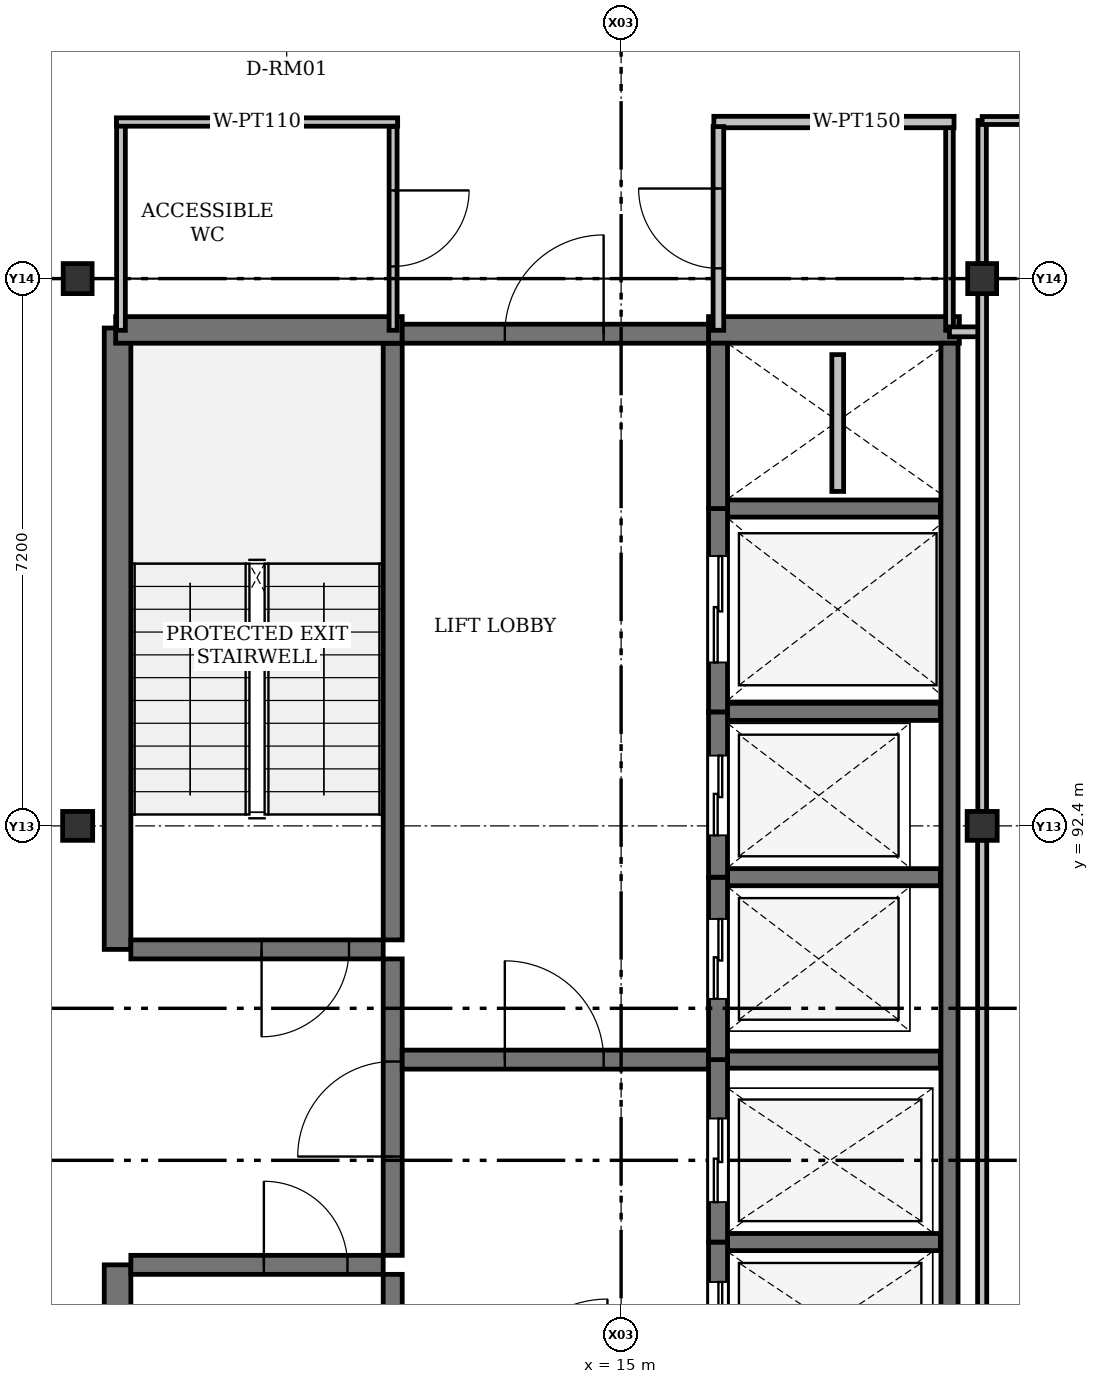
"""IFC4 building model, lengths in metres.
Left out: names, types, materials, properties, quantities, classifications, styles, units other than length and angle.
Written with IfcOpenShell. Run it as: python <this file> out.ifc"""

import sys

from ifc_helpers import new_model, si_unit, direction, frame, frame_2d, origin, origin_2d, place, context, subcontext, project, spatial, rectangle, i_section, extrude, element, fill, save


model = new_model("IFC4")
c1 = context("Model", 3, precision=1e-05, world=origin(), true_north=direction((0.0, 1.0)))
c2 = subcontext(c1, "Body", "Model", "MODEL_VIEW")
j1 = project(units=[si_unit("LENGTHUNIT", "METRE"), si_unit("PLANEANGLEUNIT", "RADIAN")], contexts=[c1])
p1 = place(None, origin())
s1 = spatial("IfcSite", under=j1, at=p1, CompositionType="ELEMENT")
p2 = place(p1, origin())
s2 = spatial("IfcBuilding", under=s1, at=p2, CompositionType="ELEMENT")
p3 = place(p2, frame((0.0, 0.0, 14.1)))
s3 = spatial("IfcBuildingStorey", under=s2, at=p3, CompositionType="ELEMENT", Elevation=14.1)
for number, where, z_axis, x_axis in (
    (1, (7.85, 92.4, 0.0), (0.0, 0.0, 1.0), (1.0, 0.0, 0.0)),
    (2, (19.75, 92.4, 0.0), (0.0, 0.0, 1.0), (1.0, 0.0, 0.0)),
    (3, (7.85, 99.6, 0.0), (0.0, 0.0, 1.0), (0.0, 1.0, 0.0)),
    (4, (19.75, 99.6, 0.0), (0.0, 0.0, 1.0), (0.0, 1.0, 0.0)),
):
    element("IfcColumn", number, at=place(p3, frame(where, z_axis=z_axis, x_axis=x_axis)), inside=s3, PredefinedType="COLUMN", context=c2, shape_type="SweptSolid", body=[
        extrude(i_section(OverallWidth=0.395, OverallDepth=0.38, WebThickness=0.019, FlangeThickness=0.03, FilletRadius=0.015, at=origin_2d()), origin(), (0.0, 0.0, 1.0), 4.2),
    ])
for number, where, z_axis, x_axis in (
    (5, (8.375, 78.45, 0.0), (0.0, 0.0, 1.0), (0.0, 1.0, 0.0)),
    (6, (8.375, 90.775, 0.0), (0.0, 0.0, 1.0), (0.0, 1.0, 0.0)),
):
    element("IfcWall", number, at=place(p3, frame(where, z_axis=z_axis, x_axis=x_axis)), inside=s3, PredefinedType="SHEAR", context=c2, shape_type="SweptSolid", body=[
        extrude(rectangle(XDim=8.175, YDim=0.35, at=frame_2d((4.087, 0.0))), origin(), (0.0, 0.0, 1.0), 4.2),
    ])
for number, where, z_axis, x_axis in (
    (7, (11.995, 78.65, 0.0), (0.0, 0.0, 1.0), (0.0, 1.0, 0.0)),
    (8, (11.995, 90.9, 0.0), (0.0, 0.0, 1.0), (0.0, 1.0, 0.0)),
):
    element("IfcWall", number, at=place(p3, frame(where, z_axis=z_axis, x_axis=x_axis)), inside=s3, PredefinedType="SHEAR", context=c2, shape_type="SweptSolid", body=[
        extrude(rectangle(XDim=7.85, YDim=0.25, at=frame_2d((3.925, 0.0))), origin(), (0.0, 0.0, 1.0), 4.2),
    ])
p4 = place(p3, frame((11.995, 86.75, 0.0), z_axis=(0.0, 0.0, 1.0), x_axis=(0.0, 1.0, 0.0)))
e9 = element("IfcWall", 9, at=p4, inside=s3, PredefinedType="SHEAR", context=c2, shape_type="SweptSolid", body=[
    extrude(rectangle(XDim=3.9, YDim=0.25, at=frame_2d((1.95, 0.0))), origin(), (0.0, 0.0, 1.0), 4.2),
])
p5 = place(p4, frame((1.3, 0.0, 0.0)))
e10 = element("IfcOpeningElement", 10, at=p5, cuts=e9, PredefinedType="OPENING", context=c2, shape_type="SweptSolid", body=[
    extrude(rectangle(XDim=1.25, YDim=2.2, at=frame_2d((0.625, 1.1))), frame((0.0, 0.125, 0.0), z_axis=(0.0, -1.0, 0.0), x_axis=(1.0, 0.0, 0.0)), (0.0, 0.0, 1.0), 0.25),
])
p6 = place(p3, frame((8.35, 98.925, 0.0), z_axis=(0.0, 0.0, 1.0), x_axis=(1.0, 0.0, 0.0)))
e11 = element("IfcWall", 11, at=p6, inside=s3, PredefinedType="SHEAR", context=c2, shape_type="SweptSolid", body=[
    extrude(rectangle(XDim=3.77, YDim=0.35, at=frame_2d((1.885, 0.0))), origin(), (0.0, 0.0, 1.0), 4.2),
])
p7 = place(p3, frame((16.15, 98.925, 0.0), z_axis=(0.0, 0.0, 1.0), x_axis=(1.0, 0.0, 0.0)))
e12 = element("IfcWall", 12, at=p7, inside=s3, PredefinedType="SHEAR", context=c2, shape_type="SweptSolid", body=[
    extrude(rectangle(XDim=3.3, YDim=0.35, at=frame_2d((1.65, 0.0))), origin(), (0.0, 0.0, 1.0), 4.2),
])
p8 = place(p3, frame((12.12, 98.875, 0.0), z_axis=(0.0, 0.0, 1.0), x_axis=(1.0, 0.0, 0.0)))
e13 = element("IfcWall", 13, at=p8, inside=s3, PredefinedType="SHEAR", context=c2, shape_type="SweptSolid", body=[
    extrude(rectangle(XDim=4.03, YDim=0.25, at=frame_2d((2.015, 0.0))), origin(), (0.0, 0.0, 1.0), 4.2),
])
p9 = place(p8, frame((1.35, 0.0, 0.0)))
e14 = element("IfcOpeningElement", 14, at=p9, cuts=e13, PredefinedType="OPENING", context=c2, shape_type="SweptSolid", body=[
    extrude(rectangle(XDim=1.3, YDim=2.2, at=frame_2d((0.65, 1.1))), frame((0.0, 0.125, 0.0), z_axis=(0.0, -1.0, 0.0), x_axis=(1.0, 0.0, 0.0)), (0.0, 0.0, 1.0), 0.25),
])
p10 = place(p3, frame((8.55, 86.625, 0.0), z_axis=(0.0, 0.0, 1.0), x_axis=(1.0, 0.0, 0.0)))
e15 = element("IfcWall", 15, at=p10, inside=s3, PredefinedType="SHEAR", context=c2, shape_type="SweptSolid", body=[
    extrude(rectangle(XDim=3.32, YDim=0.25, at=frame_2d((1.66, 0.0))), origin(), (0.0, 0.0, 1.0), 4.2),
])
p11 = place(p10, frame((1.75, 0.0, 0.0)))
e16 = element("IfcOpeningElement", 16, at=p11, cuts=e15, PredefinedType="OPENING", context=c2, shape_type="SweptSolid", body=[
    extrude(rectangle(XDim=1.1, YDim=2.15, at=frame_2d((0.55, 1.075))), frame((0.0, 0.125, 0.0), z_axis=(0.0, -1.0, 0.0), x_axis=(1.0, 0.0, 0.0)), (0.0, 0.0, 1.0), 0.25),
])
p12 = place(p3, frame((11.87, 90.775, 0.0), z_axis=(0.0, 0.0, 1.0), x_axis=(-1.0, 0.0, 0.0)))
e17 = element("IfcWall", 17, at=p12, inside=s3, PredefinedType="SHEAR", context=c2, shape_type="SweptSolid", body=[
    extrude(rectangle(XDim=3.32, YDim=0.25, at=frame_2d((1.66, 0.0))), origin(), (0.0, 0.0, 1.0), 4.2),
])
p13 = place(p12, frame((0.45, 0.0, 0.0)))
e18 = element("IfcOpeningElement", 18, at=p13, cuts=e17, PredefinedType="OPENING", context=c2, shape_type="SweptSolid", body=[
    extrude(rectangle(XDim=1.15, YDim=2.15, at=frame_2d((0.575, 1.075))), frame((0.0, 0.125, 0.0), z_axis=(0.0, -1.0, 0.0), x_axis=(1.0, 0.0, 0.0)), (0.0, 0.0, 1.0), 0.25),
])
p14 = place(p3, frame((12.12, 89.325, 0.0), z_axis=(0.0, 0.0, 1.0), x_axis=(1.0, 0.0, 0.0)))
e19 = element("IfcWall", 19, at=p14, inside=s3, PredefinedType="SHEAR", context=c2, shape_type="SweptSolid", body=[
    extrude(rectangle(XDim=4.03, YDim=0.25, at=frame_2d((2.015, 0.0))), origin(), (0.0, 0.0, 1.0), 4.2),
])
p15 = place(p14, frame((1.35, 0.0, 0.0)))
e20 = element("IfcOpeningElement", 20, at=p15, cuts=e19, PredefinedType="OPENING", context=c2, shape_type="SweptSolid", body=[
    extrude(rectangle(XDim=1.3, YDim=2.2, at=frame_2d((0.65, 1.1))), frame((0.0, 0.125, 0.0), z_axis=(0.0, -1.0, 0.0), x_axis=(1.0, 0.0, 0.0)), (0.0, 0.0, 1.0), 0.25),
])
p16 = place(p3, frame((19.32, 84.8, 0.0), z_axis=(0.0, 0.0, 1.0), x_axis=(0.0, 1.0, 0.0)))
e21 = element("IfcWall", 21, at=p16, inside=s3, PredefinedType="SHEAR", context=c2, shape_type="SweptSolid", body=[
    extrude(rectangle(XDim=13.95, YDim=0.225, at=frame_2d((6.975, 0.0))), origin(), (0.0, 0.0, 1.0), 4.2),
])
for number, where, z_axis, x_axis in (
    (22, (16.4, 86.925, 0.0), (0.0, 0.0, 1.0), (1.0, 0.0, 0.0)),
    (23, (16.4, 89.325, 0.0), (0.0, 0.0, 1.0), (1.0, 0.0, 0.0)),
    (24, (16.4, 91.725, 0.0), (0.0, 0.0, 1.0), (1.0, 0.0, 0.0)),
    (25, (16.4, 93.9, 0.0), (0.0, 0.0, 1.0), (1.0, 0.0, 0.0)),
    (26, (16.4, 96.575, 0.0), (0.0, 0.0, 1.0), (1.0, 0.0, 0.0)),
):
    element("IfcWall", number, at=place(p3, frame(where, z_axis=z_axis, x_axis=x_axis)), inside=s3, PredefinedType="SHEAR", context=c2, shape_type="SweptSolid", body=[
        extrude(rectangle(XDim=2.8, YDim=0.225, at=frame_2d((1.4, 0.0))), origin(), (0.0, 0.0, 1.0), 4.2),
    ])
p17 = place(p3, frame((16.275, 84.8, 0.0), z_axis=(0.0, 0.0, 1.0), x_axis=(0.0, 1.0, 0.0)))
e27 = element("IfcWall", 27, at=p17, inside=s3, PredefinedType="SHEAR", context=c2, shape_type="SweptSolid", body=[
    extrude(rectangle(XDim=2.125, YDim=0.25, at=frame_2d((1.062, 0.0))), origin(), (0.0, 0.0, 1.0), 4.2),
])
p18 = place(p17, frame((0.5, 0.0, 0.0)))
e28 = element("IfcOpeningElement", 28, at=p18, cuts=e27, PredefinedType="OPENING", context=c2, shape_type="SweptSolid", body=[
    extrude(rectangle(XDim=1.1, YDim=2.15, at=frame_2d((0.55, 1.075))), frame((0.0, 0.125, 0.0), z_axis=(0.0, -1.0, 0.0), x_axis=(1.0, 0.0, 0.0)), (0.0, 0.0, 1.0), 0.25),
])
p19 = place(p3, frame((16.275, 86.925, 0.0), z_axis=(0.0, 0.0, 1.0), x_axis=(0.0, 1.0, 0.0)))
e29 = element("IfcWall", 29, at=p19, inside=s3, PredefinedType="SHEAR", context=c2, shape_type="SweptSolid", body=[
    extrude(rectangle(XDim=2.4, YDim=0.25, at=frame_2d((1.2, 0.0))), origin(), (0.0, 0.0, 1.0), 4.2),
])
p20 = place(p19, frame((0.525, 0.0, 0.0)))
e30 = element("IfcOpeningElement", 30, at=p20, cuts=e29, PredefinedType="OPENING", context=c2, shape_type="SweptSolid", body=[
    extrude(rectangle(XDim=1.1, YDim=2.15, at=frame_2d((0.55, 1.075))), frame((0.0, 0.125, 0.0), z_axis=(0.0, -1.0, 0.0), x_axis=(1.0, 0.0, 0.0)), (0.0, 0.0, 1.0), 0.25),
])
p21 = place(p3, frame((16.275, 89.325, 0.0), z_axis=(0.0, 0.0, 1.0), x_axis=(0.0, 1.0, 0.0)))
e31 = element("IfcWall", 31, at=p21, inside=s3, PredefinedType="SHEAR", context=c2, shape_type="SweptSolid", body=[
    extrude(rectangle(XDim=2.4, YDim=0.25, at=frame_2d((1.2, 0.0))), origin(), (0.0, 0.0, 1.0), 4.2),
])
p22 = place(p21, frame((0.8, 0.0, 0.0)))
e32 = element("IfcOpeningElement", 32, at=p22, cuts=e31, PredefinedType="OPENING", context=c2, shape_type="SweptSolid", body=[
    extrude(rectangle(XDim=1.05, YDim=2.15, at=frame_2d((0.525, 1.075))), frame((0.0, 0.125, 0.0), z_axis=(0.0, -1.0, 0.0), x_axis=(1.0, 0.0, 0.0)), (0.0, 0.0, 1.0), 0.25),
])
p23 = place(p3, frame((16.275, 91.725, 0.0), z_axis=(0.0, 0.0, 1.0), x_axis=(0.0, 1.0, 0.0)))
e33 = element("IfcWall", 33, at=p23, inside=s3, PredefinedType="SHEAR", context=c2, shape_type="SweptSolid", body=[
    extrude(rectangle(XDim=2.175, YDim=0.25, at=frame_2d((1.087, 0.0))), origin(), (0.0, 0.0, 1.0), 4.2),
])
p24 = place(p23, frame((0.55, 0.0, 0.0)))
e34 = element("IfcOpeningElement", 34, at=p24, cuts=e33, PredefinedType="OPENING", context=c2, shape_type="SweptSolid", body=[
    extrude(rectangle(XDim=1.05, YDim=2.15, at=frame_2d((0.525, 1.075))), frame((0.0, 0.125, 0.0), z_axis=(0.0, -1.0, 0.0), x_axis=(1.0, 0.0, 0.0)), (0.0, 0.0, 1.0), 0.25),
])
p25 = place(p3, frame((16.275, 93.9, 0.0), z_axis=(0.0, 0.0, 1.0), x_axis=(0.0, 1.0, 0.0)))
e35 = element("IfcWall", 35, at=p25, inside=s3, PredefinedType="SHEAR", context=c2, shape_type="SweptSolid", body=[
    extrude(rectangle(XDim=2.675, YDim=0.25, at=frame_2d((1.337, 0.0))), origin(), (0.0, 0.0, 1.0), 4.2),
])
p26 = place(p25, frame((0.65, 0.0, 0.0)))
e36 = element("IfcOpeningElement", 36, at=p26, cuts=e35, PredefinedType="OPENING", context=c2, shape_type="SweptSolid", body=[
    extrude(rectangle(XDim=1.4, YDim=2.25, at=frame_2d((0.7, 1.125))), frame((0.0, 0.125, 0.0), z_axis=(0.0, -1.0, 0.0), x_axis=(1.0, 0.0, 0.0)), (0.0, 0.0, 1.0), 0.25),
])
p27 = place(p3, frame((16.275, 96.575, 0.0), z_axis=(0.0, 0.0, 1.0), x_axis=(0.0, 1.0, 0.0)))
e37 = element("IfcWall", 37, at=p27, inside=s3, PredefinedType="SHEAR", context=c2, shape_type="SweptSolid", body=[
    extrude(rectangle(XDim=2.175, YDim=0.25, at=frame_2d((1.087, 0.0))), origin(), (0.0, 0.0, 1.0), 4.2),
])
p28 = place(p3, frame((17.85, 96.8, 0.0), z_axis=(0.0, 0.0, 1.0), x_axis=(0.0, 1.0, 0.0)))
e38 = element("IfcWall", 38, at=p28, inside=s3, PredefinedType="PLUMBINGWALL", context=c2, shape_type="SweptSolid", body=[
    extrude(rectangle(XDim=1.8, YDim=0.155, at=frame_2d((0.9, 0.0))), origin(), (0.0, 0.0, 1.0), 4.2),
])
p29 = place(p3, frame((8.42, 98.92, 0.0), z_axis=(0.0, 0.0, 1.0), x_axis=(0.0, 1.0, 0.0)))
e39 = element("IfcWall", 39, at=p29, inside=s3, PredefinedType="PARTITIONING", context=c2, shape_type="SweptSolid", body=[
    extrude(rectangle(XDim=2.74, YDim=0.115, at=frame_2d((1.37, 0.0))), origin(), (0.0, 0.0, 1.0), 3.451),
])
p30 = place(p3, frame((8.36, 101.66, 0.0), z_axis=(0.0, 0.0, 1.0), x_axis=(1.0, 0.0, 0.0)))
e40 = element("IfcWall", 40, at=p30, inside=s3, PredefinedType="PARTITIONING", context=c2, shape_type="SweptSolid", body=[
    extrude(rectangle(XDim=3.7, YDim=0.11, at=frame_2d((1.85, 0.0))), origin(), (0.0, 0.0, 1.0), 3.95),
])
p31 = place(p3, frame((12.0, 101.6, 0.0), z_axis=(0.0, 0.0, 1.0), x_axis=(0.0, -1.0, 0.0)))
e41 = element("IfcWall", 41, at=p31, inside=s3, PredefinedType="PARTITIONING", context=c2, shape_type="SweptSolid", body=[
    extrude(rectangle(XDim=2.68, YDim=0.105, at=frame_2d((1.34, 0.0))), origin(), (0.0, 0.0, 1.0), 3.451),
])
p32 = place(p31, frame((0.84, 0.0, 0.0)))
e42 = element("IfcOpeningElement", 42, at=p32, cuts=e41, PredefinedType="OPENING", context=c2, shape_type="SweptSolid", body=[
    extrude(rectangle(XDim=1.0, YDim=2.2, at=frame_2d((0.5, 1.1))), frame((0.0, 0.052, 0.0), z_axis=(0.0, -1.0, 0.0), x_axis=(1.0, 0.0, 0.0)), (0.0, 0.0, 1.0), 0.105),
])
p33 = place(p3, frame((19.32, 98.92, 0.0), z_axis=(0.0, 0.0, 1.0), x_axis=(0.0, 1.0, 0.0)))
e43 = element("IfcWall", 43, at=p33, inside=s3, PredefinedType="PARTITIONING", context=c2, shape_type="SweptSolid", body=[
    extrude(rectangle(XDim=2.74, YDim=0.1, at=frame_2d((1.37, 0.0))), origin(), (0.0, 0.0, 1.0), 3.451),
])
p34 = place(p3, frame((19.38, 101.66, 0.0), z_axis=(0.0, 0.0, 1.0), x_axis=(-1.0, 0.0, 0.0)))
e44 = element("IfcWall", 44, at=p34, inside=s3, PredefinedType="PARTITIONING", context=c2, shape_type="SweptSolid", body=[
    extrude(rectangle(XDim=3.16, YDim=0.15, at=frame_2d((1.58, 0.0))), origin(), (0.0, 0.0, 1.0), 3.95),
])
p35 = place(p3, frame((16.28, 98.92, 0.0), z_axis=(0.0, 0.0, 1.0), x_axis=(0.0, 1.0, 0.0)))
e45 = element("IfcWall", 45, at=p35, inside=s3, PredefinedType="PARTITIONING", context=c2, shape_type="SweptSolid", body=[
    extrude(rectangle(XDim=2.68, YDim=0.14, at=frame_2d((1.34, 0.0))), origin(), (0.0, 0.0, 1.0), 3.451),
])
p36 = place(p35, frame((0.815, 0.0, 0.0)))
e46 = element("IfcOpeningElement", 46, at=p36, cuts=e45, PredefinedType="OPENING", context=c2, shape_type="SweptSolid", body=[
    extrude(rectangle(XDim=1.05, YDim=2.2, at=frame_2d((0.525, 1.1))), frame((0.0, 0.07, 0.0), z_axis=(0.0, -1.0, 0.0), x_axis=(1.0, 0.0, 0.0)), (0.0, 0.0, 1.0), 0.14),
])
p37 = place(p3, frame((19.75, 98.9, 0.0), z_axis=(0.0, 0.0, 1.0), x_axis=(-1.0, 0.0, 0.0)))
e47 = element("IfcWall", 47, at=p37, inside=s3, PredefinedType="PARTITIONING", context=c2, shape_type="SweptSolid", body=[
    extrude(rectangle(XDim=0.43, YDim=0.13, at=frame_2d((0.215, 0.0))), origin(), (0.0, 0.0, 1.0), 3.527),
])
p38 = place(p3, frame((19.75, 85.393, 0.0), z_axis=(0.0, 0.0, 1.0), x_axis=(0.0, 1.0, 0.0)))
e48 = element("IfcWall", 48, at=p38, inside=s3, PredefinedType="PARTITIONING", context=c2, shape_type="SweptSolid", body=[
    extrude(rectangle(XDim=6.823, YDim=0.12, at=frame_2d((3.411, 0.0))), origin(), (0.0, 0.0, 1.0), 3.527),
])
p39 = place(p3, frame((19.75, 92.585, 0.0), z_axis=(0.0, 0.0, 1.0), x_axis=(0.0, 1.0, 0.0)))
e49 = element("IfcWall", 49, at=p39, inside=s3, PredefinedType="PARTITIONING", context=c2, shape_type="SweptSolid", body=[
    extrude(rectangle(XDim=6.823, YDim=0.115, at=frame_2d((3.411, 0.0))), origin(), (0.0, 0.0, 1.0), 3.527),
])
p40 = place(p3, frame((19.75, 99.792, 0.0), z_axis=(0.0, 0.0, 1.0), x_axis=(0.0, 1.0, 0.0)))
e50 = element("IfcWall", 50, at=p40, inside=s3, PredefinedType="PARTITIONING", context=c2, shape_type="SweptSolid", body=[
    extrude(rectangle(XDim=1.887, YDim=0.11, at=frame_2d((0.944, 0.0))), origin(), (0.0, 0.0, 1.0), 3.527),
])
p41 = place(p3, frame((19.75, 101.68, 0.0), z_axis=(0.0, 0.0, 1.0), x_axis=(1.0, 0.0, 0.0)))
e51 = element("IfcWall", 51, at=p41, inside=s3, PredefinedType="PARTITIONING", context=c2, shape_type="SweptSolid", body=[
    extrude(rectangle(XDim=9.415, YDim=0.105, at=frame_2d((4.708, 0.0))), origin(), (0.0, 0.0, 1.0), 3.527),
])
p42 = place(p41, frame((0.56, 0.0, 0.0)))
e52 = element("IfcOpeningElement", 52, at=p42, cuts=e51, PredefinedType="OPENING", context=c2, shape_type="SweptSolid", body=[
    extrude(rectangle(XDim=0.98, YDim=2.1, at=frame_2d((0.49, 1.05))), frame((0.0, 0.052, 0.0), z_axis=(0.0, -1.0, 0.0), x_axis=(1.0, 0.0, 0.0)), (0.0, 0.0, 1.0), 0.105),
])
p43 = place(p5, origin())
e53 = element("IfcDoor", 53, at=p43, inside=s3, OperationType="SINGLE_SWING_LEFT", PredefinedType="DOOR", context=c2, shape_type="SweptSolid", body=[
    extrude(rectangle(XDim=1.25, YDim=2.2, at=frame_2d((0.625, 1.1))), frame((0.0, 0.025, 0.0), z_axis=(0.0, -1.0, 0.0), x_axis=(1.0, 0.0, 0.0)), (0.0, 0.0, 1.0), 0.05),
])
fill(e10, e53)
p44 = place(p9, origin())
e54 = element("IfcDoor", 54, at=p44, inside=s3, OperationType="SINGLE_SWING_RIGHT", PredefinedType="DOOR", context=c2, shape_type="SweptSolid", body=[
    extrude(rectangle(XDim=1.3, YDim=2.2, at=frame_2d((0.65, 1.1))), frame((0.0, 0.025, 0.0), z_axis=(0.0, -1.0, 0.0), x_axis=(1.0, 0.0, 0.0)), (0.0, 0.0, 1.0), 0.05),
])
fill(e14, e54)
p45 = place(p11, origin())
e55 = element("IfcDoor", 55, at=p45, inside=s3, OperationType="SINGLE_SWING_LEFT", PredefinedType="DOOR", context=c2, shape_type="SweptSolid", body=[
    extrude(rectangle(XDim=1.1, YDim=2.15, at=frame_2d((0.55, 1.075))), frame((0.0, 0.025, 0.0), z_axis=(0.0, -1.0, 0.0), x_axis=(1.0, 0.0, 0.0)), (0.0, 0.0, 1.0), 0.05),
])
fill(e16, e55)
p46 = place(p13, origin())
e56 = element("IfcDoor", 56, at=p46, inside=s3, OperationType="SINGLE_SWING_RIGHT", PredefinedType="DOOR", context=c2, shape_type="SweptSolid", body=[
    extrude(rectangle(XDim=1.15, YDim=2.15, at=frame_2d((0.575, 1.075))), frame((0.0, 0.025, 0.0), z_axis=(0.0, -1.0, 0.0), x_axis=(1.0, 0.0, 0.0)), (0.0, 0.0, 1.0), 0.05),
])
fill(e18, e56)
p47 = place(p15, origin())
e57 = element("IfcDoor", 57, at=p47, inside=s3, OperationType="SINGLE_SWING_LEFT", PredefinedType="DOOR", context=c2, shape_type="SweptSolid", body=[
    extrude(rectangle(XDim=1.3, YDim=2.2, at=frame_2d((0.65, 1.1))), frame((0.0, 0.025, 0.0), z_axis=(0.0, -1.0, 0.0), x_axis=(1.0, 0.0, 0.0)), (0.0, 0.0, 1.0), 0.05),
])
fill(e20, e57)
p48 = place(p18, origin())
e58 = element("IfcDoor", 58, at=p48, inside=s3, OperationType="SLIDING_TO_LEFT", PredefinedType="DOOR", context=c2, shape_type="SweptSolid", body=[
    extrude(rectangle(XDim=1.1, YDim=2.15, at=frame_2d((0.55, 1.075))), frame((0.0, 0.025, 0.0), z_axis=(0.0, -1.0, 0.0), x_axis=(1.0, 0.0, 0.0)), (0.0, 0.0, 1.0), 0.05),
])
fill(e28, e58)
p49 = place(p20, origin())
e59 = element("IfcDoor", 59, at=p49, inside=s3, OperationType="SLIDING_TO_LEFT", PredefinedType="DOOR", context=c2, shape_type="SweptSolid", body=[
    extrude(rectangle(XDim=1.1, YDim=2.15, at=frame_2d((0.55, 1.075))), frame((0.0, 0.025, 0.0), z_axis=(0.0, -1.0, 0.0), x_axis=(1.0, 0.0, 0.0)), (0.0, 0.0, 1.0), 0.05),
])
fill(e30, e59)
p50 = place(p22, origin())
e60 = element("IfcDoor", 60, at=p50, inside=s3, OperationType="SLIDING_TO_LEFT", PredefinedType="DOOR", context=c2, shape_type="SweptSolid", body=[
    extrude(rectangle(XDim=1.05, YDim=2.15, at=frame_2d((0.525, 1.075))), frame((0.0, 0.025, 0.0), z_axis=(0.0, -1.0, 0.0), x_axis=(1.0, 0.0, 0.0)), (0.0, 0.0, 1.0), 0.05),
])
fill(e32, e60)
p51 = place(p24, origin())
e61 = element("IfcDoor", 61, at=p51, inside=s3, OperationType="SLIDING_TO_LEFT", PredefinedType="DOOR", context=c2, shape_type="SweptSolid", body=[
    extrude(rectangle(XDim=1.05, YDim=2.15, at=frame_2d((0.525, 1.075))), frame((0.0, 0.025, 0.0), z_axis=(0.0, -1.0, 0.0), x_axis=(1.0, 0.0, 0.0)), (0.0, 0.0, 1.0), 0.05),
])
fill(e34, e61)
p52 = place(p26, origin())
e62 = element("IfcDoor", 62, at=p52, inside=s3, OperationType="SLIDING_TO_LEFT", PredefinedType="DOOR", context=c2, shape_type="SweptSolid", body=[
    extrude(rectangle(XDim=1.4, YDim=2.25, at=frame_2d((0.7, 1.125))), frame((0.0, 0.025, 0.0), z_axis=(0.0, -1.0, 0.0), x_axis=(1.0, 0.0, 0.0)), (0.0, 0.0, 1.0), 0.05),
])
fill(e36, e62)
p53 = place(p32, origin())
e63 = element("IfcDoor", 63, at=p53, inside=s3, OperationType="SINGLE_SWING_LEFT", PredefinedType="DOOR", context=c2, shape_type="SweptSolid", body=[
    extrude(rectangle(XDim=1.0, YDim=2.2, at=frame_2d((0.5, 1.1))), frame((0.0, 0.025, 0.0), z_axis=(0.0, -1.0, 0.0), x_axis=(1.0, 0.0, 0.0)), (0.0, 0.0, 1.0), 0.05),
])
fill(e42, e63)
p54 = place(p36, origin())
e64 = element("IfcDoor", 64, at=p54, inside=s3, OperationType="SINGLE_SWING_RIGHT", PredefinedType="DOOR", context=c2, shape_type="SweptSolid", body=[
    extrude(rectangle(XDim=1.05, YDim=2.2, at=frame_2d((0.525, 1.1))), frame((0.0, 0.025, 0.0), z_axis=(0.0, -1.0, 0.0), x_axis=(1.0, 0.0, 0.0)), (0.0, 0.0, 1.0), 0.05),
])
fill(e46, e64)
save(model, sys.argv[1])
